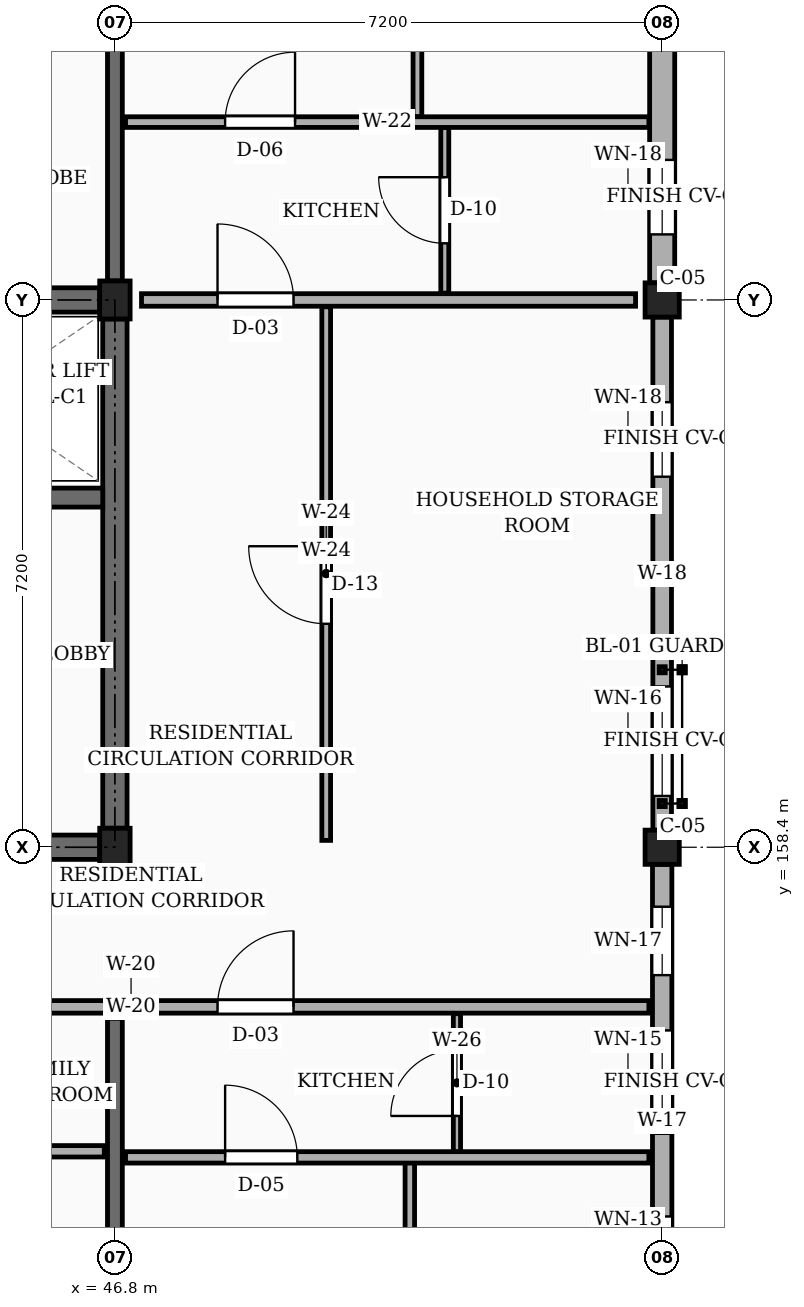
"""IFC4 building model, lengths in metres.
Left out: names, types, materials, properties, quantities, classifications, styles, units other than length and angle.
Written with IfcOpenShell. Run it as: python <this file> out.ifc"""

import sys

from ifc_helpers import new_model, si_unit, direction, frame, frame_2d, origin, origin_2d, place, context, subcontext, project, spatial, rectangle, extrude, element, fill, save


model = new_model("IFC4")
c1 = context("Model", 3, precision=1e-05, world=origin(), true_north=direction((0.0, 1.0)))
c2 = subcontext(c1, "Body", "Model", "MODEL_VIEW")
j1 = project(units=[si_unit("LENGTHUNIT", "METRE"), si_unit("PLANEANGLEUNIT", "RADIAN")], contexts=[c1])
p1 = place(None, origin())
s1 = spatial("IfcSite", under=j1, at=p1, CompositionType="ELEMENT")
p2 = place(p1, origin())
s2 = spatial("IfcBuilding", under=s1, at=p2, CompositionType="ELEMENT")
p3 = place(p2, frame((0.0, 0.0, 39.15)))
s3 = spatial("IfcBuildingStorey", under=s2, at=p3, CompositionType="ELEMENT", Elevation=39.15)
for number, where, z_axis, x_axis in (
    (1, (46.8, 158.4, 0.0), (0.0, 0.0, 1.0), (1.0, 0.0, 0.0)),
    (2, (46.8, 165.6, 0.0), (0.0, 0.0, 1.0), (1.0, 0.0, 0.0)),
):
    element("IfcColumn", number, at=place(p3, frame(where, z_axis=z_axis, x_axis=x_axis)), inside=s3, PredefinedType="COLUMN", context=c2, shape_type="SweptSolid", body=[
        extrude(rectangle(XDim=0.4, YDim=0.5, at=origin_2d()), origin(), (0.0, 0.0, 1.0), 3.15),
    ])
for number, where, z_axis, x_axis in (
    (3, (54.0, 158.4, 0.0), (0.0, 0.0, 1.0), (1.0, 0.0, 0.0)),
    (4, (54.0, 165.6, 0.0), (0.0, 0.0, 1.0), (1.0, 0.0, 0.0)),
):
    element("IfcColumn", number, at=place(p3, frame(where, z_axis=z_axis, x_axis=x_axis)), inside=s3, PredefinedType="COLUMN", context=c2, shape_type="SweptSolid", body=[
        extrude(rectangle(XDim=0.45, YDim=0.45, at=origin_2d()), origin(), (0.0, 0.0, 1.0), 3.15),
    ])
p4 = place(p3, frame((46.8, 151.425, 0.0), z_axis=(0.0, 0.0, 1.0), x_axis=(0.0, 1.0, 0.0)))
e5 = element("IfcWall", 5, at=p4, inside=s3, PredefinedType="SOLIDWALL", context=c2, shape_type="SweptSolid", body=[
    extrude(rectangle(XDim=4.725, YDim=0.195, at=frame_2d((2.362, 0.0))), origin(), (0.0, 0.0, 1.0), 2.185),
])
p5 = place(p3, frame((46.8, 165.85, 0.0), z_axis=(0.0, 0.0, 1.0), x_axis=(0.0, 1.0, 0.0)))
e6 = element("IfcWall", 6, at=p5, inside=s3, PredefinedType="SOLIDWALL", context=c2, shape_type="SweptSolid", body=[
    extrude(rectangle(XDim=6.725, YDim=0.195, at=frame_2d((3.362, 0.0))), origin(), (0.0, 0.0, 1.0), 2.185),
])
p6 = place(p3, frame((54.0, 151.425, 0.0), z_axis=(0.0, 0.0, 1.0), x_axis=(0.0, 1.0, 0.0)))
e7 = element("IfcWall", 7, at=p6, inside=s3, PredefinedType="SOLIDWALL", context=c2, shape_type="SweptSolid", body=[
    extrude(rectangle(XDim=6.75, YDim=0.255, at=frame_2d((3.375, 0.0))), origin(), (0.0, 0.0, 1.0), 2.455),
])
p7 = place(p6, frame((0.917, 0.0, 0.78)))
e8 = element("IfcOpeningElement", 8, at=p7, cuts=e7, PredefinedType="OPENING", context=c2, shape_type="SweptSolid", body=[
    extrude(rectangle(XDim=1.2, YDim=1.26, at=frame_2d((0.6, 0.63))), frame((0.0, 0.137, 0.0), z_axis=(0.0, -1.0, 0.0), x_axis=(1.0, 0.0, 0.0)), (0.0, 0.0, 1.0), 0.275),
])
p8 = place(p6, frame((3.205, 0.0, 0.78)))
e9 = element("IfcOpeningElement", 9, at=p8, cuts=e7, PredefinedType="OPENING", context=c2, shape_type="SweptSolid", body=[
    extrude(rectangle(XDim=1.36, YDim=1.26, at=frame_2d((0.68, 0.63))), frame((0.0, 0.137, 0.0), z_axis=(0.0, -1.0, 0.0), x_axis=(1.0, 0.0, 0.0)), (0.0, 0.0, 1.0), 0.275),
])
p9 = place(p6, frame((5.292, 0.0, 0.78)))
e10 = element("IfcOpeningElement", 10, at=p9, cuts=e7, PredefinedType="OPENING", context=c2, shape_type="SweptSolid", body=[
    extrude(rectangle(XDim=0.9, YDim=1.36, at=frame_2d((0.45, 0.68))), frame((0.0, 0.137, 0.0), z_axis=(0.0, -1.0, 0.0), x_axis=(1.0, 0.0, 0.0)), (0.0, 0.0, 1.0), 0.275),
])
p10 = place(p3, frame((54.0, 158.625, 0.0), z_axis=(0.0, 0.0, 1.0), x_axis=(0.0, 1.0, 0.0)))
e11 = element("IfcWall", 11, at=p10, inside=s3, PredefinedType="SOLIDWALL", context=c2, shape_type="SweptSolid", body=[
    extrude(rectangle(XDim=6.75, YDim=0.245, at=frame_2d((3.375, 0.0))), origin(), (0.0, 0.0, 1.0), 2.455),
])
p11 = place(p10, frame((0.45, 0.0, 0.78)))
e12 = element("IfcOpeningElement", 12, at=p11, cuts=e11, PredefinedType="OPENING", context=c2, shape_type="SweptSolid", body=[
    extrude(rectangle(XDim=1.44, YDim=1.26, at=frame_2d((0.72, 0.63))), frame((0.0, 0.133, 0.0), z_axis=(0.0, -1.0, 0.0), x_axis=(1.0, 0.0, 0.0)), (0.0, 0.0, 1.0), 0.265),
])
p12 = place(p10, frame((4.65, 0.0, 0.78)))
e13 = element("IfcOpeningElement", 13, at=p12, cuts=e11, PredefinedType="OPENING", context=c2, shape_type="SweptSolid", body=[
    extrude(rectangle(XDim=0.98, YDim=1.36, at=frame_2d((0.49, 0.68))), frame((0.0, 0.133, 0.0), z_axis=(0.0, -1.0, 0.0), x_axis=(1.0, 0.0, 0.0)), (0.0, 0.0, 1.0), 0.265),
])
p13 = place(p3, frame((54.0, 165.825, 0.0), z_axis=(0.0, 0.0, 1.0), x_axis=(0.0, 1.0, 0.0)))
e14 = element("IfcWall", 14, at=p13, inside=s3, PredefinedType="SOLIDWALL", context=c2, shape_type="SweptSolid", body=[
    extrude(rectangle(XDim=6.75, YDim=0.33, at=frame_2d((3.375, 0.0))), origin(), (0.0, 0.0, 1.0), 2.455),
])
p14 = place(p13, frame((0.637, 0.0, 0.78)))
e15 = element("IfcOpeningElement", 15, at=p14, cuts=e14, PredefinedType="OPENING", context=c2, shape_type="SweptSolid", body=[
    extrude(rectangle(XDim=0.98, YDim=1.36, at=frame_2d((0.49, 0.68))), frame((0.0, 0.175, 0.0), z_axis=(0.0, -1.0, 0.0), x_axis=(1.0, 0.0, 0.0)), (0.0, 0.0, 1.0), 0.35),
])
p15 = place(p13, frame((3.792, 0.0, 0.78)))
e16 = element("IfcOpeningElement", 16, at=p15, cuts=e14, PredefinedType="OPENING", context=c2, shape_type="SweptSolid", body=[
    extrude(rectangle(XDim=1.14, YDim=1.36, at=frame_2d((0.57, 0.68))), frame((0.0, 0.175, 0.0), z_axis=(0.0, -1.0, 0.0), x_axis=(1.0, 0.0, 0.0)), (0.0, 0.0, 1.0), 0.35),
])
p16 = place(p3, frame((39.8, 165.6, 0.0), z_axis=(0.0, 0.0, 1.0), x_axis=(1.0, 0.0, 0.0)))
e17 = element("IfcWall", 17, at=p16, inside=s3, PredefinedType="SHEAR", context=c2, shape_type="SweptSolid", body=[
    extrude(rectangle(XDim=6.8, YDim=0.32, at=frame_2d((3.4, 0.0))), origin(), (0.0, 0.0, 1.0), 2.885),
])
p17 = place(p3, frame((46.8, 158.65, 0.0), z_axis=(0.0, 0.0, 1.0), x_axis=(0.0, 1.0, 0.0)))
e18 = element("IfcWall", 18, at=p17, inside=s3, PredefinedType="SHEAR", context=c2, shape_type="SweptSolid", body=[
    extrude(rectangle(XDim=6.7, YDim=0.32, at=frame_2d((3.35, 0.0))), origin(), (0.0, 0.0, 1.0), 2.885),
])
p18 = place(p3, frame((39.8, 158.4, 0.0), z_axis=(0.0, 0.0, 1.0), x_axis=(1.0, 0.0, 0.0)))
e19 = element("IfcWall", 19, at=p18, inside=s3, PredefinedType="SHEAR", context=c2, shape_type="SweptSolid", body=[
    extrude(rectangle(XDim=6.8, YDim=0.32, at=frame_2d((3.4, 0.0))), origin(), (0.0, 0.0, 1.0), 2.885),
])
p19 = place(p18, frame((4.55, 0.0, 0.0)))
e20 = element("IfcOpeningElement", 20, at=p19, cuts=e19, PredefinedType="OPENING", context=c2, shape_type="SweptSolid", body=[
    extrude(rectangle(XDim=1.1, YDim=2.15, at=frame_2d((0.55, 1.075))), frame((0.0, 0.17, 0.0), z_axis=(0.0, -1.0, 0.0), x_axis=(1.0, 0.0, 0.0)), (0.0, 0.0, 1.0), 0.34),
])
p20 = place(p3, frame((43.325, 163.0, 0.0), z_axis=(0.0, 0.0, 1.0), x_axis=(1.0, 0.0, 0.0)))
e21 = element("IfcWall", 21, at=p20, inside=s3, PredefinedType="SHEAR", context=c2, shape_type="SweptSolid", body=[
    extrude(rectangle(XDim=3.315, YDim=0.25, at=frame_2d((1.657, 0.0))), origin(), (0.0, 0.0, 1.0), 2.885),
])
p21 = place(p20, frame((1.1, 0.0, 0.0)))
e22 = element("IfcOpeningElement", 22, at=p21, cuts=e21, PredefinedType="OPENING", context=c2, shape_type="SweptSolid", body=[
    extrude(rectangle(XDim=1.0, YDim=2.2, at=frame_2d((0.5, 1.1))), frame((0.0, 0.135, 0.0), z_axis=(0.0, -1.0, 0.0), x_axis=(1.0, 0.0, 0.0)), (0.0, 0.0, 1.0), 0.27),
])
p22 = place(p3, frame((39.62, 156.3, 0.0), z_axis=(0.0, 0.0, 1.0), x_axis=(1.0, 0.0, 0.0)))
e23 = element("IfcWall", 23, at=p22, inside=s3, PredefinedType="PARTITIONING", context=c2, shape_type="SweptSolid", body=[
    extrude(rectangle(XDim=7.16, YDim=0.165, at=frame_2d((3.58, 0.0))), origin(), (0.0, 0.0, 1.0), 2.32),
])
p23 = place(p22, frame((1.33, 0.0, 0.0)))
e24 = element("IfcOpeningElement", 24, at=p23, cuts=e23, PredefinedType="OPENING", context=c2, shape_type="SweptSolid", body=[
    extrude(rectangle(XDim=1.14, YDim=2.18, at=frame_2d((0.57, 1.09))), frame((0.0, 0.093, 0.0), z_axis=(0.0, -1.0, 0.0), x_axis=(1.0, 0.0, 0.0)), (0.0, 0.0, 1.0), 0.185),
])
p24 = place(p3, frame((46.82, 156.3, 0.0), z_axis=(0.0, 0.0, 1.0), x_axis=(1.0, 0.0, 0.0)))
e25 = element("IfcWall", 25, at=p24, inside=s3, PredefinedType="PARTITIONING", context=c2, shape_type="SweptSolid", body=[
    extrude(rectangle(XDim=7.005, YDim=0.165, at=frame_2d((3.502, 0.0))), origin(), (0.0, 0.0, 1.0), 2.32),
])
p25 = place(p24, frame((1.33, 0.0, 0.0)))
e26 = element("IfcOpeningElement", 26, at=p25, cuts=e25, PredefinedType="OPENING", context=c2, shape_type="SweptSolid", body=[
    extrude(rectangle(XDim=1.0, YDim=2.15, at=frame_2d((0.5, 1.075))), frame((0.0, 0.093, 0.0), z_axis=(0.0, -1.0, 0.0), x_axis=(1.0, 0.0, 0.0)), (0.0, 0.0, 1.0), 0.185),
])
p26 = place(p3, frame((47.15, 165.6, 0.0), z_axis=(0.0, 0.0, 1.0), x_axis=(1.0, 0.0, 0.0)))
e27 = element("IfcWall", 27, at=p26, inside=s3, PredefinedType="PARTITIONING", context=c2, shape_type="SweptSolid", body=[
    extrude(rectangle(XDim=6.5, YDim=0.165, at=frame_2d((3.25, 0.0))), origin(), (0.0, 0.0, 1.0), 2.32),
])
p27 = place(p26, frame((1.0, 0.0, 0.0)))
e28 = element("IfcOpeningElement", 28, at=p27, cuts=e27, PredefinedType="OPENING", context=c2, shape_type="SweptSolid", body=[
    extrude(rectangle(XDim=1.0, YDim=2.15, at=frame_2d((0.5, 1.075))), frame((0.0, 0.093, 0.0), z_axis=(0.0, -1.0, 0.0), x_axis=(1.0, 0.0, 0.0)), (0.0, 0.0, 1.0), 0.185),
])
p28 = place(p3, frame((39.74, 154.4, 0.0), z_axis=(0.0, 0.0, 1.0), x_axis=(1.0, 0.0, 0.0)))
e29 = element("IfcWall", 29, at=p28, inside=s3, PredefinedType="PARTITIONING", context=c2, shape_type="SweptSolid", body=[
    extrude(rectangle(XDim=6.92, YDim=0.15, at=frame_2d((3.46, 0.0))), origin(), (0.0, 0.0, 1.0), 2.32),
])
p29 = place(p28, frame((1.31, 0.0, 0.0)))
e30 = element("IfcOpeningElement", 30, at=p29, cuts=e29, PredefinedType="OPENING", context=c2, shape_type="SweptSolid", body=[
    extrude(rectangle(XDim=0.92, YDim=2.1, at=frame_2d((0.46, 1.05))), frame((0.0, 0.085, 0.0), z_axis=(0.0, -1.0, 0.0), x_axis=(1.0, 0.0, 0.0)), (0.0, 0.0, 1.0), 0.17),
])
p30 = place(p3, frame((49.58, 158.49, 0.0), z_axis=(0.0, 0.0, 1.0), x_axis=(0.0, 1.0, 0.0)))
e31 = element("IfcWall", 31, at=p30, inside=s3, PredefinedType="PARTITIONING", context=c2, shape_type="SweptSolid", body=[
    extrude(rectangle(XDim=7.02, YDim=0.115, at=frame_2d((3.51, 0.0))), origin(), (0.0, 0.0, 1.0), 2.32),
])
p31 = place(p30, frame((2.85, 0.0, 0.0)))
e32 = element("IfcOpeningElement", 32, at=p31, cuts=e31, PredefinedType="OPENING", context=c2, shape_type="SweptSolid", body=[
    extrude(rectangle(XDim=1.02, YDim=2.15, at=frame_2d((0.51, 1.075))), frame((0.0, 0.067, 0.0), z_axis=(0.0, -1.0, 0.0), x_axis=(1.0, 0.0, 0.0)), (0.0, 0.0, 1.0), 0.135),
])
p32 = place(p3, frame((50.68, 151.375, 0.0), z_axis=(0.0, 0.0, 1.0), x_axis=(0.0, 1.0, 0.0)))
e33 = element("IfcWall", 33, at=p32, inside=s3, PredefinedType="PARTITIONING", context=c2, shape_type="SweptSolid", body=[
    extrude(rectangle(XDim=2.875, YDim=0.125, at=frame_2d((1.438, 0.0))), origin(), (0.0, 0.0, 1.0), 2.32),
])
p33 = place(p32, frame((0.988, 0.0, 0.0)))
e34 = element("IfcOpeningElement", 34, at=p33, cuts=e33, PredefinedType="OPENING", context=c2, shape_type="SweptSolid", body=[
    extrude(rectangle(XDim=0.9, YDim=2.1, at=frame_2d((0.45, 1.05))), frame((0.0, 0.073, 0.0), z_axis=(0.0, -1.0, 0.0), x_axis=(1.0, 0.0, 0.0)), (0.0, 0.0, 1.0), 0.145),
])
p34 = place(p3, frame((51.3, 154.39, 0.0), z_axis=(0.0, 0.0, 1.0), x_axis=(0.0, 1.0, 0.0)))
e35 = element("IfcWall", 35, at=p34, inside=s3, PredefinedType="PARTITIONING", context=c2, shape_type="SweptSolid", body=[
    extrude(rectangle(XDim=1.82, YDim=0.095, at=frame_2d((0.91, 0.0))), origin(), (0.0, 0.0, 1.0), 2.32),
])
p35 = place(p34, frame((0.475, 0.0, 0.0)))
e36 = element("IfcOpeningElement", 36, at=p35, cuts=e35, PredefinedType="OPENING", context=c2, shape_type="SweptSolid", body=[
    extrude(rectangle(XDim=0.87, YDim=2.05, at=frame_2d((0.435, 1.025))), frame((0.0, 0.058, 0.0), z_axis=(0.0, -1.0, 0.0), x_axis=(1.0, 0.0, 0.0)), (0.0, 0.0, 1.0), 0.115),
])
p36 = place(p3, frame((46.94, 154.32, 0.0), z_axis=(0.0, 0.0, 1.0), x_axis=(1.0, 0.0, 0.0)))
e37 = element("IfcWall", 37, at=p36, inside=s3, PredefinedType="PARTITIONING", context=c2, shape_type="SweptSolid", body=[
    extrude(rectangle(XDim=6.885, YDim=0.15, at=frame_2d((3.442, 0.0))), origin(), (0.0, 0.0, 1.0), 2.32),
])
p37 = place(p36, frame((1.31, 0.0, 0.0)))
e38 = element("IfcOpeningElement", 38, at=p37, cuts=e37, PredefinedType="OPENING", context=c2, shape_type="SweptSolid", body=[
    extrude(rectangle(XDim=0.95, YDim=2.1, at=frame_2d((0.475, 1.05))), frame((0.0, 0.085, 0.0), z_axis=(0.0, -1.0, 0.0), x_axis=(1.0, 0.0, 0.0)), (0.0, 0.0, 1.0), 0.17),
])
p38 = place(p3, frame((50.78, 168.01, 0.0), z_axis=(0.0, 0.0, 1.0), x_axis=(0.0, 1.0, 0.0)))
e39 = element("IfcWall", 39, at=p38, inside=s3, PredefinedType="PARTITIONING", context=c2, shape_type="SweptSolid", body=[
    extrude(rectangle(XDim=4.615, YDim=0.115, at=frame_2d((2.308, 0.0))), origin(), (0.0, 0.0, 1.0), 2.32),
])
p39 = place(p38, frame((1.867, 0.0, 0.0)))
e40 = element("IfcOpeningElement", 40, at=p39, cuts=e39, PredefinedType="OPENING", context=c2, shape_type="SweptSolid", body=[
    extrude(rectangle(XDim=0.88, YDim=2.08, at=frame_2d((0.44, 1.04))), frame((0.0, 0.067, 0.0), z_axis=(0.0, -1.0, 0.0), x_axis=(1.0, 0.0, 0.0)), (0.0, 0.0, 1.0), 0.135),
])
p40 = place(p3, frame((51.14, 165.69, 0.0), z_axis=(0.0, 0.0, 1.0), x_axis=(0.0, 1.0, 0.0)))
e41 = element("IfcWall", 41, at=p40, inside=s3, PredefinedType="PARTITIONING", context=c2, shape_type="SweptSolid", body=[
    extrude(rectangle(XDim=2.18, YDim=0.105, at=frame_2d((1.09, 0.0))), origin(), (0.0, 0.0, 1.0), 2.32),
])
p41 = place(p40, frame((0.655, 0.0, 0.0)))
e42 = element("IfcOpeningElement", 42, at=p41, cuts=e41, PredefinedType="OPENING", context=c2, shape_type="SweptSolid", body=[
    extrude(rectangle(XDim=0.87, YDim=2.05, at=frame_2d((0.435, 1.025))), frame((0.0, 0.062, 0.0), z_axis=(0.0, -1.0, 0.0), x_axis=(1.0, 0.0, 0.0)), (0.0, 0.0, 1.0), 0.125),
])
p42 = place(p3, frame((46.94, 167.94, 0.0), z_axis=(0.0, 0.0, 1.0), x_axis=(1.0, 0.0, 0.0)))
e43 = element("IfcWall", 43, at=p42, inside=s3, PredefinedType="PARTITIONING", context=c2, shape_type="SweptSolid", body=[
    extrude(rectangle(XDim=6.885, YDim=0.14, at=frame_2d((3.442, 0.0))), origin(), (0.0, 0.0, 1.0), 2.32),
])
p43 = place(p42, frame((1.31, 0.0, 0.0)))
e44 = element("IfcOpeningElement", 44, at=p43, cuts=e43, PredefinedType="OPENING", context=c2, shape_type="SweptSolid", body=[
    extrude(rectangle(XDim=0.92, YDim=2.1, at=frame_2d((0.46, 1.05))), frame((0.0, 0.08, 0.0), z_axis=(0.0, -1.0, 0.0), x_axis=(1.0, 0.0, 0.0)), (0.0, 0.0, 1.0), 0.16),
])
p44 = place(p7, origin())
e45 = element("IfcWindow", 45, at=p44, inside=s3, PartitioningType="SINGLE_PANEL", PredefinedType="WINDOW", context=c2, shape_type="SweptSolid", body=[
    extrude(rectangle(XDim=1.2, YDim=1.26, at=frame_2d((0.6, 0.63))), frame((0.0, 0.03, 0.0), z_axis=(0.0, -1.0, 0.0), x_axis=(1.0, 0.0, 0.0)), (0.0, 0.0, 1.0), 0.06),
])
fill(e8, e45)
p45 = place(p8, origin())
e46 = element("IfcWindow", 46, at=p45, inside=s3, PartitioningType="SINGLE_PANEL", PredefinedType="WINDOW", context=c2, shape_type="SweptSolid", body=[
    extrude(rectangle(XDim=1.36, YDim=1.26, at=frame_2d((0.68, 0.63))), frame((0.0, 0.03, 0.0), z_axis=(0.0, -1.0, 0.0), x_axis=(1.0, 0.0, 0.0)), (0.0, 0.0, 1.0), 0.06),
])
fill(e9, e46)
p46 = place(p9, origin())
e47 = element("IfcWindow", 47, at=p46, inside=s3, PartitioningType="SINGLE_PANEL", PredefinedType="WINDOW", context=c2, shape_type="SweptSolid", body=[
    extrude(rectangle(XDim=0.9, YDim=1.36, at=frame_2d((0.45, 0.68))), frame((0.0, 0.03, 0.0), z_axis=(0.0, -1.0, 0.0), x_axis=(1.0, 0.0, 0.0)), (0.0, 0.0, 1.0), 0.06),
])
fill(e10, e47)
p47 = place(p11, origin())
e48 = element("IfcWindow", 48, at=p47, inside=s3, PartitioningType="SINGLE_PANEL", PredefinedType="WINDOW", context=c2, shape_type="SweptSolid", body=[
    extrude(rectangle(XDim=1.44, YDim=1.26, at=frame_2d((0.72, 0.63))), frame((0.0, 0.03, 0.0), z_axis=(0.0, -1.0, 0.0), x_axis=(1.0, 0.0, 0.0)), (0.0, 0.0, 1.0), 0.06),
])
fill(e12, e48)
p48 = place(p12, origin())
e49 = element("IfcWindow", 49, at=p48, inside=s3, PartitioningType="SINGLE_PANEL", PredefinedType="WINDOW", context=c2, shape_type="SweptSolid", body=[
    extrude(rectangle(XDim=0.98, YDim=1.36, at=frame_2d((0.49, 0.68))), frame((0.0, 0.03, 0.0), z_axis=(0.0, -1.0, 0.0), x_axis=(1.0, 0.0, 0.0)), (0.0, 0.0, 1.0), 0.06),
])
fill(e13, e49)
p49 = place(p14, origin())
e50 = element("IfcWindow", 50, at=p49, inside=s3, PartitioningType="SINGLE_PANEL", PredefinedType="WINDOW", context=c2, shape_type="SweptSolid", body=[
    extrude(rectangle(XDim=0.98, YDim=1.36, at=frame_2d((0.49, 0.68))), frame((0.0, 0.03, 0.0), z_axis=(0.0, -1.0, 0.0), x_axis=(1.0, 0.0, 0.0)), (0.0, 0.0, 1.0), 0.06),
])
fill(e15, e50)
p50 = place(p25, origin())
e51 = element("IfcDoor", 51, at=p50, inside=s3, OperationType="SINGLE_SWING_RIGHT", PredefinedType="DOOR", context=c2, shape_type="SweptSolid", body=[
    extrude(rectangle(XDim=1.0, YDim=2.15, at=frame_2d((0.5, 1.075))), frame((0.0, 0.025, 0.0), z_axis=(0.0, -1.0, 0.0), x_axis=(1.0, 0.0, 0.0)), (0.0, 0.0, 1.0), 0.05),
])
fill(e26, e51)
p51 = place(p27, origin())
e52 = element("IfcDoor", 52, at=p51, inside=s3, OperationType="SINGLE_SWING_LEFT", PredefinedType="DOOR", context=c2, shape_type="SweptSolid", body=[
    extrude(rectangle(XDim=1.0, YDim=2.15, at=frame_2d((0.5, 1.075))), frame((0.0, 0.025, 0.0), z_axis=(0.0, -1.0, 0.0), x_axis=(1.0, 0.0, 0.0)), (0.0, 0.0, 1.0), 0.05),
])
fill(e28, e52)
p52 = place(p31, origin())
e53 = element("IfcDoor", 53, at=p52, inside=s3, OperationType="SINGLE_SWING_RIGHT", PredefinedType="DOOR", context=c2, shape_type="SweptSolid", body=[
    extrude(rectangle(XDim=1.02, YDim=2.15, at=frame_2d((0.51, 1.075))), frame((0.0, 0.025, 0.0), z_axis=(0.0, -1.0, 0.0), x_axis=(1.0, 0.0, 0.0)), (0.0, 0.0, 1.0), 0.05),
])
fill(e32, e53)
p53 = place(p35, origin())
e54 = element("IfcDoor", 54, at=p53, inside=s3, OperationType="SINGLE_SWING_LEFT", PredefinedType="DOOR", context=c2, shape_type="SweptSolid", body=[
    extrude(rectangle(XDim=0.87, YDim=2.05, at=frame_2d((0.435, 1.025))), frame((0.0, 0.025, 0.0), z_axis=(0.0, -1.0, 0.0), x_axis=(1.0, 0.0, 0.0)), (0.0, 0.0, 1.0), 0.05),
])
fill(e36, e54)
p54 = place(p37, origin())
e55 = element("IfcDoor", 55, at=p54, inside=s3, OperationType="SINGLE_SWING_LEFT", PredefinedType="DOOR", context=c2, shape_type="SweptSolid", body=[
    extrude(rectangle(XDim=0.95, YDim=2.1, at=frame_2d((0.475, 1.05))), frame((0.0, 0.025, 0.0), z_axis=(0.0, -1.0, 0.0), x_axis=(1.0, 0.0, 0.0)), (0.0, 0.0, 1.0), 0.05),
])
fill(e38, e55)
p55 = place(p41, origin())
e56 = element("IfcDoor", 56, at=p55, inside=s3, OperationType="SINGLE_SWING_RIGHT", PredefinedType="DOOR", context=c2, shape_type="SweptSolid", body=[
    extrude(rectangle(XDim=0.87, YDim=2.05, at=frame_2d((0.435, 1.025))), frame((0.0, 0.025, 0.0), z_axis=(0.0, -1.0, 0.0), x_axis=(1.0, 0.0, 0.0)), (0.0, 0.0, 1.0), 0.05),
])
fill(e42, e56)
p56 = place(p43, origin())
e57 = element("IfcDoor", 57, at=p56, inside=s3, OperationType="SINGLE_SWING_RIGHT", PredefinedType="DOOR", context=c2, shape_type="SweptSolid", body=[
    extrude(rectangle(XDim=0.92, YDim=2.1, at=frame_2d((0.46, 1.05))), frame((0.0, 0.025, 0.0), z_axis=(0.0, -1.0, 0.0), x_axis=(1.0, 0.0, 0.0)), (0.0, 0.0, 1.0), 0.05),
])
fill(e44, e57)
save(model, sys.argv[1])
